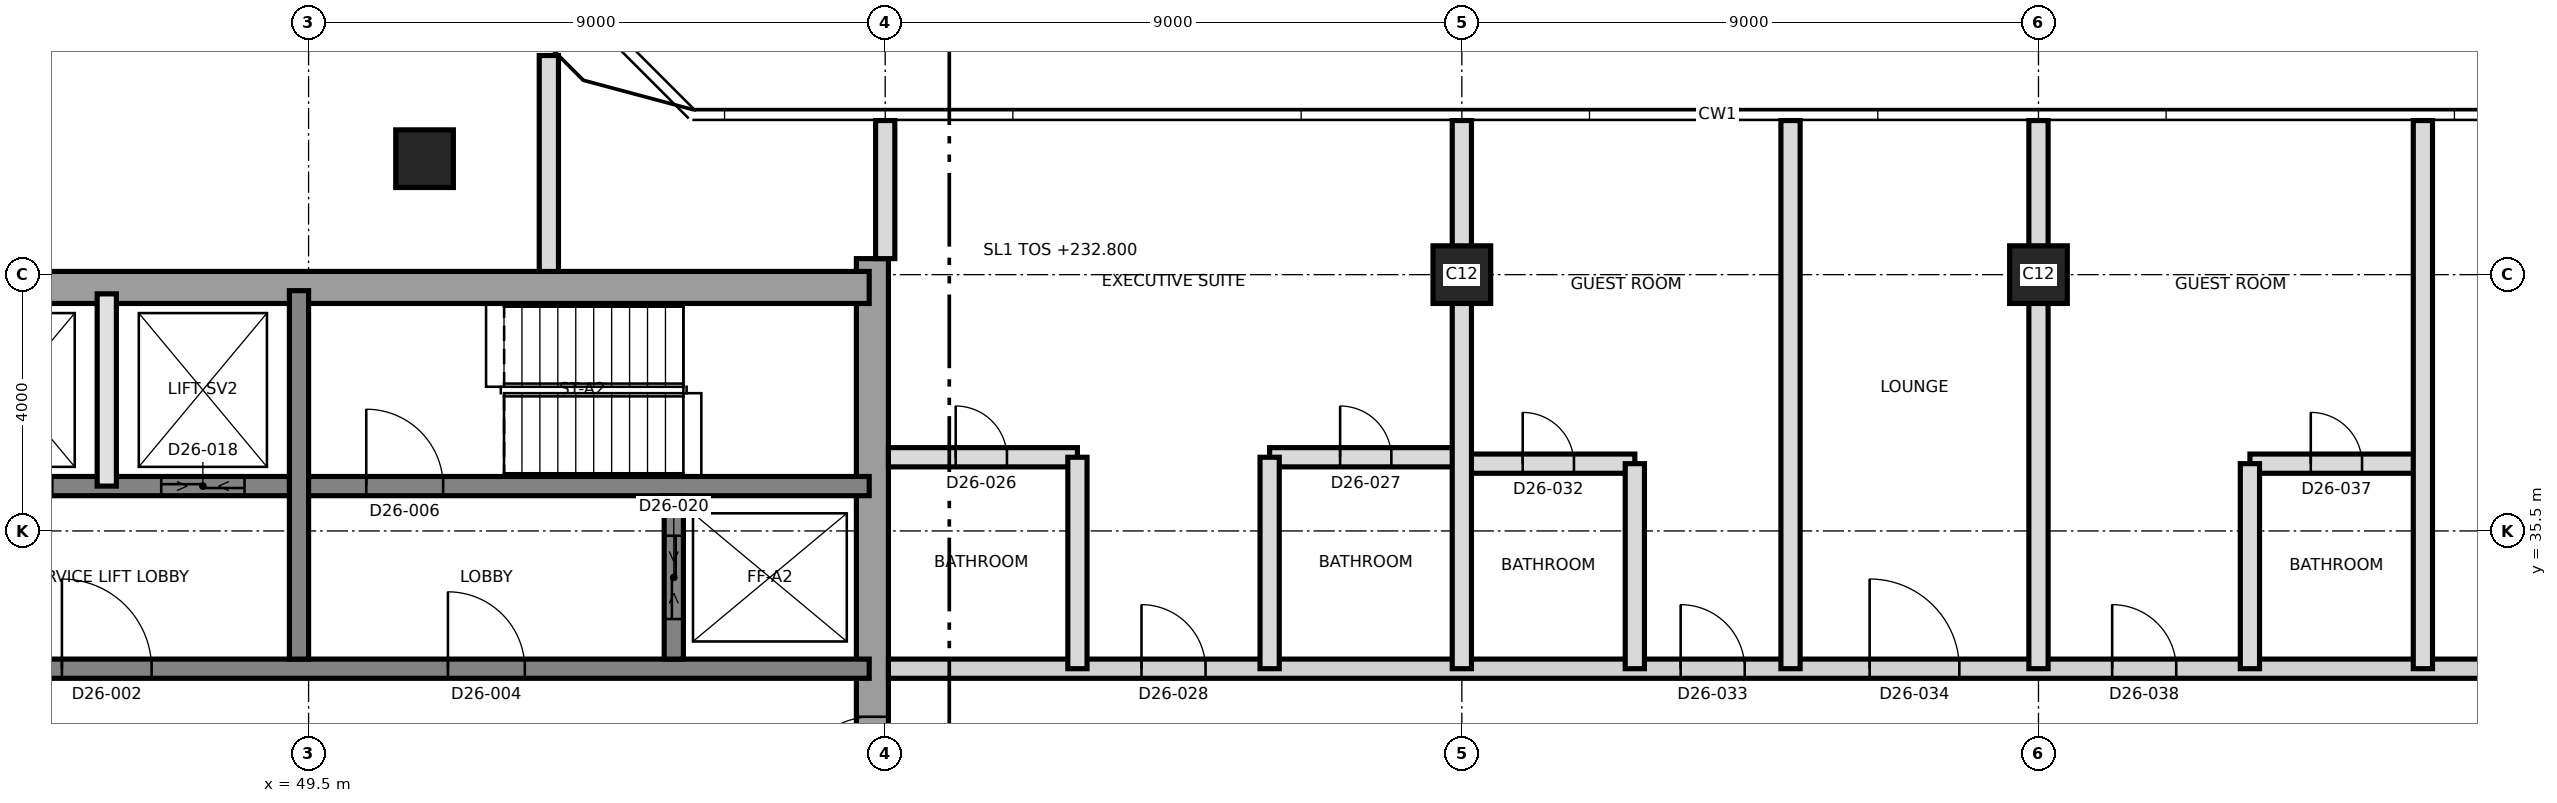
"""IFC4 building model, lengths in metres.
Left out: names, types, materials, properties, quantities, classifications, styles, units other than length and angle.
Written with IfcOpenShell. Run it as: python <this file> out.ifc"""

import sys

from ifc_helpers import new_model, si_unit, direction, frame, frame_2d, origin, origin_2d, place, context, subcontext, project, spatial, rectangle, extrude, element, fill, save


model = new_model("IFC4")
c1 = context("Model", 3, precision=1e-05, world=origin(), true_north=direction((0.0, 1.0)))
c2 = subcontext(c1, "Body", "Model", "MODEL_VIEW")
j1 = project(units=[si_unit("LENGTHUNIT", "METRE"), si_unit("PLANEANGLEUNIT", "RADIAN")], contexts=[c1])
p1 = place(None, origin())
s1 = spatial("IfcSite", under=j1, at=p1, CompositionType="ELEMENT")
p2 = place(p1, origin())
s2 = spatial("IfcBuilding", under=s1, at=p2, CompositionType="ELEMENT")
p3 = place(p2, frame((0.0, 0.0, 232.8)))
s3 = spatial("IfcBuildingStorey", under=s2, at=p3, CompositionType="ELEMENT", Elevation=232.8)
p4 = place(p3, frame((58.3, 21.25, 0.0), z_axis=(0.0, 0.0, 1.0), x_axis=(0.0, 1.0, 0.0)))
e1 = element("IfcWall", 1, at=p4, inside=s3, PredefinedType="SHEAR", context=c2, shape_type="SweptSolid", body=[
    extrude(rectangle(XDim=18.5, YDim=0.5, at=frame_2d((9.25, 0.0))), origin(), (0.0, 0.0, 1.0), 3.7),
])
p5 = place(p4, frame((10.15, 0.0, 0.0)))
e2 = element("IfcOpeningElement", 2, at=p5, cuts=e1, PredefinedType="OPENING", context=c2, shape_type="SweptSolid", body=[
    extrude(rectangle(XDim=1.2, YDim=2.1, at=frame_2d((0.6, 1.05))), frame((0.0, 0.26, 0.0), z_axis=(0.0, -1.0, 0.0), x_axis=(1.0, 0.0, 0.0)), (0.0, 0.0, 1.0), 0.52),
])
p6 = place(p3, frame((31.25, 39.3, 0.0), z_axis=(0.0, 0.0, 1.0), x_axis=(1.0, 0.0, 0.0)))
e3 = element("IfcWall", 3, at=p6, inside=s3, PredefinedType="SHEAR", context=c2, shape_type="SweptSolid", body=[
    extrude(rectangle(XDim=27.0, YDim=0.5, at=frame_2d((13.5, 0.0))), origin(), (0.0, 0.0, 1.0), 3.7),
])
p7 = place(p6, frame((10.45, 0.0, 0.0)))
e4 = element("IfcOpeningElement", 4, at=p7, cuts=e3, PredefinedType="OPENING", context=c2, shape_type="SweptSolid", body=[
    extrude(rectangle(XDim=1.2, YDim=2.1, at=frame_2d((0.6, 1.05))), frame((0.0, 0.26, 0.0), z_axis=(0.0, -1.0, 0.0), x_axis=(1.0, 0.0, 0.0)), (0.0, 0.0, 1.0), 0.52),
])
p8 = place(p3, frame((31.75, 33.35, 0.0), z_axis=(0.0, 0.0, 1.0), x_axis=(1.0, 0.0, 0.0)))
e5 = element("IfcWall", 5, at=p8, inside=s3, PredefinedType="SHEAR", context=c2, shape_type="SweptSolid", body=[
    extrude(rectangle(XDim=26.5, YDim=0.3, at=frame_2d((13.25, 0.0))), origin(), (0.0, 0.0, 1.0), 3.7),
])
p9 = place(p8, frame((13.9, 0.0, 0.0)))
e6 = element("IfcOpeningElement", 6, at=p9, cuts=e5, PredefinedType="OPENING", context=c2, shape_type="SweptSolid", body=[
    extrude(rectangle(XDim=1.4, YDim=2.1, at=frame_2d((0.7, 1.05))), frame((0.0, 0.16, 0.0), z_axis=(0.0, -1.0, 0.0), x_axis=(1.0, 0.0, 0.0)), (0.0, 0.0, 1.0), 0.32),
])
p10 = place(p8, frame((5.375, 0.0, 0.0)))
e7 = element("IfcOpeningElement", 7, at=p10, cuts=e5, PredefinedType="OPENING", context=c2, shape_type="SweptSolid", body=[
    extrude(rectangle(XDim=1.2, YDim=2.1, at=frame_2d((0.6, 1.05))), frame((0.0, 0.16, 0.0), z_axis=(0.0, -1.0, 0.0), x_axis=(1.0, 0.0, 0.0)), (0.0, 0.0, 1.0), 0.32),
])
p11 = place(p8, frame((19.925, 0.0, 0.0)))
e8 = element("IfcOpeningElement", 8, at=p11, cuts=e5, PredefinedType="OPENING", context=c2, shape_type="SweptSolid", body=[
    extrude(rectangle(XDim=1.2, YDim=2.1, at=frame_2d((0.6, 1.05))), frame((0.0, 0.16, 0.0), z_axis=(0.0, -1.0, 0.0), x_axis=(1.0, 0.0, 0.0)), (0.0, 0.0, 1.0), 0.32),
])
p12 = place(p3, frame((43.5, 36.2, 0.0), z_axis=(0.0, 0.0, 1.0), x_axis=(1.0, 0.0, 0.0)))
e9 = element("IfcWall", 9, at=p12, inside=s3, PredefinedType="SHEAR", context=c2, shape_type="SweptSolid", body=[
    extrude(rectangle(XDim=14.75, YDim=0.3, at=frame_2d((7.375, 0.0))), origin(), (0.0, 0.0, 1.0), 3.7),
])
p13 = place(p12, frame((6.9, 0.0, 0.0)))
e10 = element("IfcOpeningElement", 10, at=p13, cuts=e9, PredefinedType="OPENING", context=c2, shape_type="SweptSolid", body=[
    extrude(rectangle(XDim=1.2, YDim=2.1, at=frame_2d((0.6, 1.05))), frame((0.0, 0.16, 0.0), z_axis=(0.0, -1.0, 0.0), x_axis=(1.0, 0.0, 0.0)), (0.0, 0.0, 1.0), 0.32),
])
p14 = place(p12, frame((0.7, 0.0, 0.0)))
e11 = element("IfcOpeningElement", 11, at=p14, cuts=e9, PredefinedType="OPENING", context=c2, shape_type="SweptSolid", body=[
    extrude(rectangle(XDim=1.3, YDim=2.4, at=frame_2d((0.65, 1.2))), frame((0.0, 0.16, 0.0), z_axis=(0.0, -1.0, 0.0), x_axis=(1.0, 0.0, 0.0)), (0.0, 0.0, 1.0), 0.32),
])
p15 = place(p12, frame((3.7, 0.0, 0.0)))
e12 = element("IfcOpeningElement", 12, at=p15, cuts=e9, PredefinedType="OPENING", context=c2, shape_type="SweptSolid", body=[
    extrude(rectangle(XDim=1.3, YDim=2.4, at=frame_2d((0.65, 1.2))), frame((0.0, 0.16, 0.0), z_axis=(0.0, -1.0, 0.0), x_axis=(1.0, 0.0, 0.0)), (0.0, 0.0, 1.0), 0.32),
])
p16 = place(p3, frame((49.35, 33.5, 0.0), z_axis=(0.0, 0.0, 1.0), x_axis=(0.0, 1.0, 0.0)))
e13 = element("IfcWall", 13, at=p16, inside=s3, PredefinedType="SHEAR", context=c2, shape_type="SweptSolid", body=[
    extrude(rectangle(XDim=5.75, YDim=0.3, at=frame_2d((2.875, 0.0))), origin(), (0.0, 0.0, 1.0), 3.7),
])
p17 = place(p3, frame((55.2, 33.5, 0.0), z_axis=(0.0, 0.0, 1.0), x_axis=(0.0, 1.0, 0.0)))
e14 = element("IfcWall", 14, at=p17, inside=s3, PredefinedType="SHEAR", context=c2, shape_type="SweptSolid", body=[
    extrude(rectangle(XDim=2.55, YDim=0.3, at=frame_2d((1.275, 0.0))), origin(), (0.0, 0.0, 1.0), 3.7),
])
p18 = place(p17, frame((0.625, 0.0, 0.0)))
e15 = element("IfcOpeningElement", 15, at=p18, cuts=e14, PredefinedType="OPENING", context=c2, shape_type="SweptSolid", body=[
    extrude(rectangle(XDim=1.3, YDim=2.4, at=frame_2d((0.65, 1.2))), frame((0.0, 0.16, 0.0), z_axis=(0.0, -1.0, 0.0), x_axis=(1.0, 0.0, 0.0)), (0.0, 0.0, 1.0), 0.32),
])
for number, where, z_axis, x_axis in (
    (16, (67.5, 39.5, 0.0), (0.0, 0.0, 1.0), (1.0, 0.0, 0.0)),
    (17, (76.5, 39.5, 0.0), (0.0, 0.0, 1.0), (1.0, 0.0, 0.0)),
    (18, (51.31, 41.31, 0.0), (0.0, 0.0, 1.0), (1.0, 0.0, 0.0)),
):
    element("IfcColumn", number, at=place(p3, frame(where, z_axis=z_axis, x_axis=x_axis)), inside=s3, PredefinedType="COLUMN", context=c2, shape_type="SweptSolid", body=[
        extrude(rectangle(XDim=0.9, YDim=0.9, at=origin_2d()), origin(), (0.0, 0.0, 1.0), 3.7),
    ])
p19 = place(p3, frame((46.35, 36.2, 0.0), z_axis=(0.0, 0.0, 1.0), x_axis=(0.0, 1.0, 0.0)))
e19 = element("IfcWall", 19, at=p19, inside=s3, PredefinedType="SOLIDWALL", context=c2, shape_type="SweptSolid", body=[
    extrude(rectangle(XDim=3.0, YDim=0.3, at=frame_2d((1.5, 0.0))), origin(), (0.0, 0.0, 1.0), 3.4),
])
p20 = place(p3, frame((58.55, 33.35, 0.0), z_axis=(0.0, 0.0, 1.0), x_axis=(1.0, 0.0, 0.0)))
e20 = element("IfcWall", 20, at=p20, inside=s3, PredefinedType="PARTITIONING", context=c2, shape_type="SweptSolid", body=[
    extrude(rectangle(XDim=26.78, YDim=0.3, at=frame_2d((13.39, 0.0))), origin(), (0.0, 0.0, 1.0), 3.4),
])
p21 = place(p20, frame((3.95, 0.0, 0.0)))
e21 = element("IfcOpeningElement", 21, at=p21, cuts=e20, PredefinedType="OPENING", context=c2, shape_type="SweptSolid", body=[
    extrude(rectangle(XDim=1.0, YDim=2.4, at=frame_2d((0.5, 1.2))), frame((0.0, 0.16, 0.0), z_axis=(0.0, -1.0, 0.0), x_axis=(1.0, 0.0, 0.0)), (0.0, 0.0, 1.0), 0.32),
])
p22 = place(p20, frame((12.365, 0.0, 0.0)))
e22 = element("IfcOpeningElement", 22, at=p22, cuts=e20, PredefinedType="OPENING", context=c2, shape_type="SweptSolid", body=[
    extrude(rectangle(XDim=1.0, YDim=2.1, at=frame_2d((0.5, 1.05))), frame((0.0, 0.16, 0.0), z_axis=(0.0, -1.0, 0.0), x_axis=(1.0, 0.0, 0.0)), (0.0, 0.0, 1.0), 0.32),
])
p23 = place(p20, frame((15.315, 0.0, 0.0)))
e23 = element("IfcOpeningElement", 23, at=p23, cuts=e20, PredefinedType="OPENING", context=c2, shape_type="SweptSolid", body=[
    extrude(rectangle(XDim=1.4, YDim=2.1, at=frame_2d((0.7, 1.05))), frame((0.0, 0.16, 0.0), z_axis=(0.0, -1.0, 0.0), x_axis=(1.0, 0.0, 0.0)), (0.0, 0.0, 1.0), 0.32),
])
p24 = place(p20, frame((19.1, 0.0, 0.0)))
e24 = element("IfcOpeningElement", 24, at=p24, cuts=e20, PredefinedType="OPENING", context=c2, shape_type="SweptSolid", body=[
    extrude(rectangle(XDim=1.0, YDim=2.1, at=frame_2d((0.5, 1.05))), frame((0.0, 0.16, 0.0), z_axis=(0.0, -1.0, 0.0), x_axis=(1.0, 0.0, 0.0)), (0.0, 0.0, 1.0), 0.32),
])
p25 = place(p20, frame((24.95, 0.0, 0.0)))
e25 = element("IfcOpeningElement", 25, at=p25, cuts=e20, PredefinedType="OPENING", context=c2, shape_type="SweptSolid", body=[
    extrude(rectangle(XDim=1.0, YDim=2.1, at=frame_2d((0.5, 1.05))), frame((0.0, 0.16, 0.0), z_axis=(0.0, -1.0, 0.0), x_axis=(1.0, 0.0, 0.0)), (0.0, 0.0, 1.0), 0.32),
])
p26 = place(p3, frame((67.5, 36.55, 0.0), z_axis=(0.0, 0.0, 1.0), x_axis=(1.0, 0.0, 0.0)))
e26 = element("IfcWall", 26, at=p26, inside=s3, PredefinedType="PARTITIONING", context=c2, shape_type="SweptSolid", body=[
    extrude(rectangle(XDim=2.7, YDim=0.3, at=frame_2d((1.35, 0.0))), origin(), (0.0, 0.0, 1.0), 3.4),
])
p27 = place(p26, frame((0.95, 0.0, 0.0)))
e27 = element("IfcOpeningElement", 27, at=p27, cuts=e26, PredefinedType="OPENING", context=c2, shape_type="SweptSolid", body=[
    extrude(rectangle(XDim=0.8, YDim=2.1, at=frame_2d((0.4, 1.05))), frame((0.0, 0.16, 0.0), z_axis=(0.0, -1.0, 0.0), x_axis=(1.0, 0.0, 0.0)), (0.0, 0.0, 1.0), 0.32),
])
p28 = place(p3, frame((79.8, 36.55, 0.0), z_axis=(0.0, 0.0, 1.0), x_axis=(1.0, 0.0, 0.0)))
e28 = element("IfcWall", 28, at=p28, inside=s3, PredefinedType="PARTITIONING", context=c2, shape_type="SweptSolid", body=[
    extrude(rectangle(XDim=2.7, YDim=0.3, at=frame_2d((1.35, 0.0))), origin(), (0.0, 0.0, 1.0), 3.4),
])
p29 = place(p28, frame((0.95, 0.0, 0.0)))
e29 = element("IfcOpeningElement", 29, at=p29, cuts=e28, PredefinedType="OPENING", context=c2, shape_type="SweptSolid", body=[
    extrude(rectangle(XDim=0.8, YDim=2.1, at=frame_2d((0.4, 1.05))), frame((0.0, 0.16, 0.0), z_axis=(0.0, -1.0, 0.0), x_axis=(1.0, 0.0, 0.0)), (0.0, 0.0, 1.0), 0.32),
])
p30 = place(p3, frame((58.55, 36.65, 0.0), z_axis=(0.0, 0.0, 1.0), x_axis=(1.0, 0.0, 0.0)))
e30 = element("IfcWall", 30, at=p30, inside=s3, PredefinedType="PARTITIONING", context=c2, shape_type="SweptSolid", body=[
    extrude(rectangle(XDim=2.95, YDim=0.3, at=frame_2d((1.475, 0.0))), origin(), (0.0, 0.0, 1.0), 3.4),
])
p31 = place(p30, frame((1.05, 0.0, 0.0)))
e31 = element("IfcOpeningElement", 31, at=p31, cuts=e30, PredefinedType="OPENING", context=c2, shape_type="SweptSolid", body=[
    extrude(rectangle(XDim=0.8, YDim=2.1, at=frame_2d((0.4, 1.05))), frame((0.0, 0.16, 0.0), z_axis=(0.0, -1.0, 0.0), x_axis=(1.0, 0.0, 0.0)), (0.0, 0.0, 1.0), 0.32),
])
p32 = place(p3, frame((64.5, 36.65, 0.0), z_axis=(0.0, 0.0, 1.0), x_axis=(1.0, 0.0, 0.0)))
e32 = element("IfcWall", 32, at=p32, inside=s3, PredefinedType="PARTITIONING", context=c2, shape_type="SweptSolid", body=[
    extrude(rectangle(XDim=3.0, YDim=0.3, at=frame_2d((1.5, 0.0))), origin(), (0.0, 0.0, 1.0), 3.4),
])
p33 = place(p32, frame((1.1, 0.0, 0.0)))
e33 = element("IfcOpeningElement", 33, at=p33, cuts=e32, PredefinedType="OPENING", context=c2, shape_type="SweptSolid", body=[
    extrude(rectangle(XDim=0.8, YDim=2.1, at=frame_2d((0.4, 1.05))), frame((0.0, 0.16, 0.0), z_axis=(0.0, -1.0, 0.0), x_axis=(1.0, 0.0, 0.0)), (0.0, 0.0, 1.0), 0.32),
])
p34 = place(p3, frame((53.25, 39.55, 0.0), z_axis=(0.0, 0.0, 1.0), x_axis=(0.0, 1.0, 0.0)))
e34 = element("IfcWall", 34, at=p34, inside=s3, PredefinedType="PARTITIONING", context=c2, shape_type="SweptSolid", body=[
    extrude(rectangle(XDim=3.37, YDim=0.3, at=frame_2d((1.685, 0.0))), origin(), (0.0, 0.0, 1.0), 3.4),
])
p35 = place(p3, frame((58.5, 39.75, 0.0), z_axis=(0.0, 0.0, 1.0), x_axis=(0.0, 1.0, 0.0)))
e35 = element("IfcWall", 35, at=p35, inside=s3, PredefinedType="PARTITIONING", context=c2, shape_type="SweptSolid", body=[
    extrude(rectangle(XDim=2.155, YDim=0.3, at=frame_2d((1.078, 0.0))), origin(), (0.0, 0.0, 1.0), 3.4),
])
for number, where, z_axis, x_axis in (
    (36, (61.5, 33.35, 0.0), (0.0, 0.0, 1.0), (0.0, 1.0, 0.0)),
    (37, (64.5, 33.35, 0.0), (0.0, 0.0, 1.0), (0.0, 1.0, 0.0)),
):
    element("IfcWall", number, at=place(p3, frame(where, z_axis=z_axis, x_axis=x_axis)), inside=s3, PredefinedType="PARTITIONING", context=c2, shape_type="SweptSolid", body=[
        extrude(rectangle(XDim=3.3, YDim=0.3, at=frame_2d((1.65, 0.0))), origin(), (0.0, 0.0, 1.0), 3.4),
    ])
p36 = place(p3, frame((67.5, 33.35, 0.0), z_axis=(0.0, 0.0, 1.0), x_axis=(0.0, 1.0, 0.0)))
e38 = element("IfcWall", 38, at=p36, inside=s3, PredefinedType="PARTITIONING", context=c2, shape_type="SweptSolid", body=[
    extrude(rectangle(XDim=8.555, YDim=0.3, at=frame_2d((4.277, 0.0))), origin(), (0.0, 0.0, 1.0), 3.4),
])
p37 = place(p3, frame((70.2, 33.35, 0.0), z_axis=(0.0, 0.0, 1.0), x_axis=(0.0, 1.0, 0.0)))
e39 = element("IfcWall", 39, at=p37, inside=s3, PredefinedType="PARTITIONING", context=c2, shape_type="SweptSolid", body=[
    extrude(rectangle(XDim=3.2, YDim=0.3, at=frame_2d((1.6, 0.0))), origin(), (0.0, 0.0, 1.0), 3.4),
])
for number, where, z_axis, x_axis in (
    (40, (72.63, 33.35, 0.0), (0.0, 0.0, 1.0), (0.0, 1.0, 0.0)),
    (41, (76.5, 33.35, 0.0), (0.0, 0.0, 1.0), (0.0, 1.0, 0.0)),
):
    element("IfcWall", number, at=place(p3, frame(where, z_axis=z_axis, x_axis=x_axis)), inside=s3, PredefinedType="PARTITIONING", context=c2, shape_type="SweptSolid", body=[
        extrude(rectangle(XDim=8.555, YDim=0.3, at=frame_2d((4.277, 0.0))), origin(), (0.0, 0.0, 1.0), 3.4),
    ])
p38 = place(p3, frame((79.8, 33.35, 0.0), z_axis=(0.0, 0.0, 1.0), x_axis=(0.0, 1.0, 0.0)))
e42 = element("IfcWall", 42, at=p38, inside=s3, PredefinedType="PARTITIONING", context=c2, shape_type="SweptSolid", body=[
    extrude(rectangle(XDim=3.2, YDim=0.3, at=frame_2d((1.6, 0.0))), origin(), (0.0, 0.0, 1.0), 3.4),
])
p39 = place(p3, frame((82.5, 33.35, 0.0), z_axis=(0.0, 0.0, 1.0), x_axis=(0.0, 1.0, 0.0)))
e43 = element("IfcWall", 43, at=p39, inside=s3, PredefinedType="PARTITIONING", context=c2, shape_type="SweptSolid", body=[
    extrude(rectangle(XDim=8.555, YDim=0.3, at=frame_2d((4.277, 0.0))), origin(), (0.0, 0.0, 1.0), 3.4),
])
p40 = place(p9, origin())
e44 = element("IfcDoor", 44, at=p40, inside=s3, OperationType="SINGLE_SWING_RIGHT", PredefinedType="DOOR", context=c2, shape_type="SweptSolid", body=[
    extrude(rectangle(XDim=1.4, YDim=2.1, at=frame_2d((0.7, 1.05))), frame((0.0, 0.025, 0.0), z_axis=(0.0, -1.0, 0.0), x_axis=(1.0, 0.0, 0.0)), (0.0, 0.0, 1.0), 0.05),
])
fill(e6, e44)
p41 = place(p11, origin())
e45 = element("IfcDoor", 45, at=p41, inside=s3, OperationType="SINGLE_SWING_RIGHT", PredefinedType="DOOR", context=c2, shape_type="SweptSolid", body=[
    extrude(rectangle(XDim=1.2, YDim=2.1, at=frame_2d((0.6, 1.05))), frame((0.0, 0.025, 0.0), z_axis=(0.0, -1.0, 0.0), x_axis=(1.0, 0.0, 0.0)), (0.0, 0.0, 1.0), 0.05),
])
fill(e8, e45)
p42 = place(p13, origin())
e46 = element("IfcDoor", 46, at=p42, inside=s3, OperationType="SINGLE_SWING_LEFT", PredefinedType="DOOR", context=c2, shape_type="SweptSolid", body=[
    extrude(rectangle(XDim=1.2, YDim=2.1, at=frame_2d((0.6, 1.05))), frame((0.0, 0.025, 0.0), z_axis=(0.0, -1.0, 0.0), x_axis=(1.0, 0.0, 0.0)), (0.0, 0.0, 1.0), 0.05),
])
fill(e10, e46)
p43 = place(p5, origin())
e47 = element("IfcDoor", 47, at=p43, inside=s3, OperationType="SINGLE_SWING_LEFT", PredefinedType="DOOR", context=c2, shape_type="SweptSolid", body=[
    extrude(rectangle(XDim=1.2, YDim=2.1, at=frame_2d((0.6, 1.05))), frame((0.0, 0.025, 0.0), z_axis=(0.0, -1.0, 0.0), x_axis=(1.0, 0.0, 0.0)), (0.0, 0.0, 1.0), 0.05),
])
fill(e2, e47)
p44 = place(p15, origin())
e48 = element("IfcDoor", 48, at=p44, inside=s3, OperationType="SLIDING_TO_LEFT", PredefinedType="DOOR", context=c2, shape_type="SweptSolid", body=[
    extrude(rectangle(XDim=1.3, YDim=2.4, at=frame_2d((0.65, 1.2))), frame((0.0, 0.025, 0.0), z_axis=(0.0, -1.0, 0.0), x_axis=(1.0, 0.0, 0.0)), (0.0, 0.0, 1.0), 0.05),
])
fill(e12, e48)
p45 = place(p18, origin())
e49 = element("IfcDoor", 49, at=p45, inside=s3, OperationType="SLIDING_TO_LEFT", PredefinedType="DOOR", context=c2, shape_type="SweptSolid", body=[
    extrude(rectangle(XDim=1.3, YDim=2.4, at=frame_2d((0.65, 1.2))), frame((0.0, 0.025, 0.0), z_axis=(0.0, -1.0, 0.0), x_axis=(1.0, 0.0, 0.0)), (0.0, 0.0, 1.0), 0.05),
])
fill(e15, e49)
p46 = place(p31, origin())
e50 = element("IfcDoor", 50, at=p46, inside=s3, OperationType="SINGLE_SWING_LEFT", PredefinedType="DOOR", context=c2, shape_type="SweptSolid", body=[
    extrude(rectangle(XDim=0.8, YDim=2.1, at=frame_2d((0.4, 1.05))), frame((0.0, 0.025, 0.0), z_axis=(0.0, -1.0, 0.0), x_axis=(1.0, 0.0, 0.0)), (0.0, 0.0, 1.0), 0.05),
])
fill(e31, e50)
p47 = place(p33, origin())
e51 = element("IfcDoor", 51, at=p47, inside=s3, OperationType="SINGLE_SWING_RIGHT", PredefinedType="DOOR", context=c2, shape_type="SweptSolid", body=[
    extrude(rectangle(XDim=0.8, YDim=2.1, at=frame_2d((0.4, 1.05))), frame((0.0, 0.025, 0.0), z_axis=(0.0, -1.0, 0.0), x_axis=(1.0, 0.0, 0.0)), (0.0, 0.0, 1.0), 0.05),
])
fill(e33, e51)
p48 = place(p21, origin())
e52 = element("IfcDoor", 52, at=p48, inside=s3, OperationType="SINGLE_SWING_LEFT", PredefinedType="DOOR", context=c2, shape_type="SweptSolid", body=[
    extrude(rectangle(XDim=1.0, YDim=2.4, at=frame_2d((0.5, 1.2))), frame((0.0, 0.025, 0.0), z_axis=(0.0, -1.0, 0.0), x_axis=(1.0, 0.0, 0.0)), (0.0, 0.0, 1.0), 0.05),
])
fill(e21, e52)
p49 = place(p27, origin())
e53 = element("IfcDoor", 53, at=p49, inside=s3, OperationType="SINGLE_SWING_LEFT", PredefinedType="DOOR", context=c2, shape_type="SweptSolid", body=[
    extrude(rectangle(XDim=0.8, YDim=2.1, at=frame_2d((0.4, 1.05))), frame((0.0, 0.025, 0.0), z_axis=(0.0, -1.0, 0.0), x_axis=(1.0, 0.0, 0.0)), (0.0, 0.0, 1.0), 0.05),
])
fill(e27, e53)
p50 = place(p22, origin())
e54 = element("IfcDoor", 54, at=p50, inside=s3, OperationType="SINGLE_SWING_LEFT", PredefinedType="DOOR", context=c2, shape_type="SweptSolid", body=[
    extrude(rectangle(XDim=1.0, YDim=2.1, at=frame_2d((0.5, 1.05))), frame((0.0, 0.025, 0.0), z_axis=(0.0, -1.0, 0.0), x_axis=(1.0, 0.0, 0.0)), (0.0, 0.0, 1.0), 0.05),
])
fill(e22, e54)
p51 = place(p23, origin())
e55 = element("IfcDoor", 55, at=p51, inside=s3, OperationType="SINGLE_SWING_RIGHT", PredefinedType="DOOR", context=c2, shape_type="SweptSolid", body=[
    extrude(rectangle(XDim=1.4, YDim=2.1, at=frame_2d((0.7, 1.05))), frame((0.0, 0.025, 0.0), z_axis=(0.0, -1.0, 0.0), x_axis=(1.0, 0.0, 0.0)), (0.0, 0.0, 1.0), 0.05),
])
fill(e23, e55)
p52 = place(p29, origin())
e56 = element("IfcDoor", 56, at=p52, inside=s3, OperationType="SINGLE_SWING_LEFT", PredefinedType="DOOR", context=c2, shape_type="SweptSolid", body=[
    extrude(rectangle(XDim=0.8, YDim=2.1, at=frame_2d((0.4, 1.05))), frame((0.0, 0.025, 0.0), z_axis=(0.0, -1.0, 0.0), x_axis=(1.0, 0.0, 0.0)), (0.0, 0.0, 1.0), 0.05),
])
fill(e29, e56)
p53 = place(p24, origin())
e57 = element("IfcDoor", 57, at=p53, inside=s3, OperationType="SINGLE_SWING_RIGHT", PredefinedType="DOOR", context=c2, shape_type="SweptSolid", body=[
    extrude(rectangle(XDim=1.0, YDim=2.1, at=frame_2d((0.5, 1.05))), frame((0.0, 0.025, 0.0), z_axis=(0.0, -1.0, 0.0), x_axis=(1.0, 0.0, 0.0)), (0.0, 0.0, 1.0), 0.05),
])
fill(e24, e57)
save(model, sys.argv[1])
